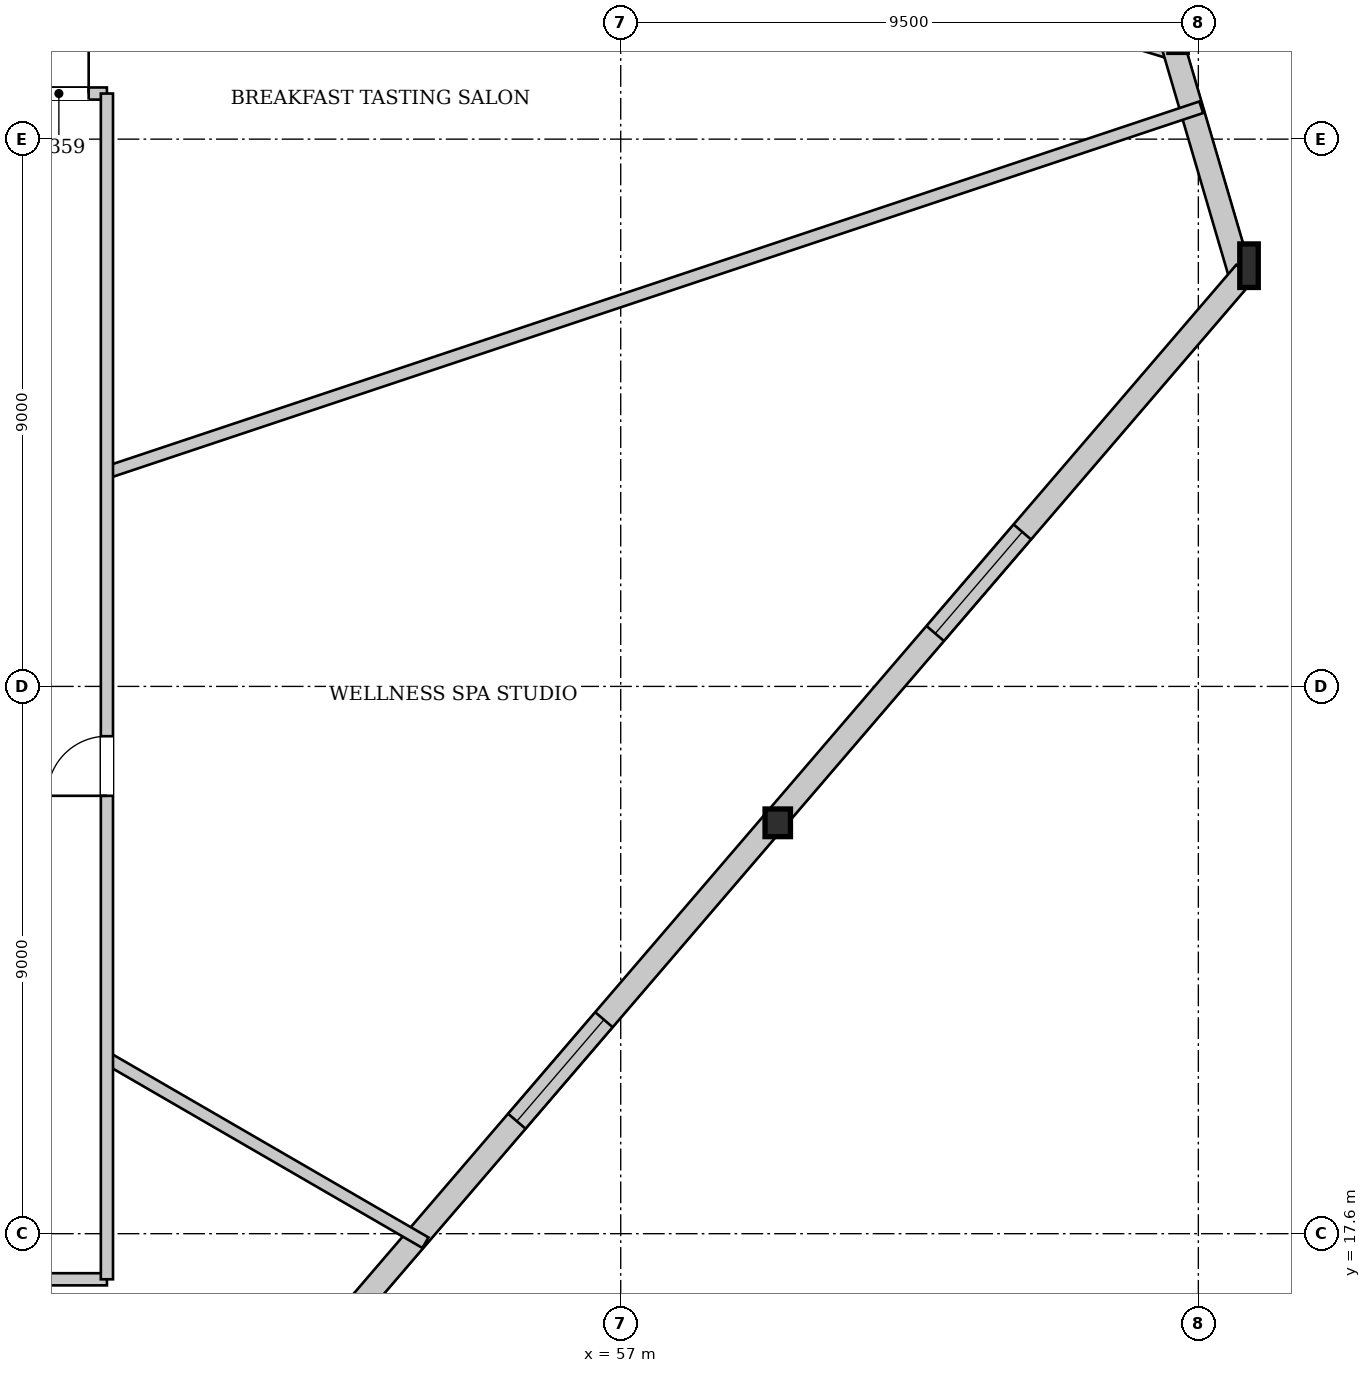
"""IFC4 building model, lengths in metres.
Left out: names, types, materials, properties, quantities, classifications, styles, units other than length and angle.
Written with IfcOpenShell. Run it as: python <this file> out.ifc"""

import sys

from ifc_helpers import new_model, si_unit, direction, frame, frame_2d, origin, origin_2d, place, context, subcontext, project, spatial, rectangle, i_section, extrude, source, transform, mapped, element, fill, save


model = new_model("IFC4")
c1 = context("Model", 3, precision=1e-05, world=origin(), true_north=direction((0.0, 1.0)))
c2 = subcontext(c1, "Body", "Model", "MODEL_VIEW")
j1 = project(units=[si_unit("LENGTHUNIT", "METRE"), si_unit("PLANEANGLEUNIT", "RADIAN")], contexts=[c1])
p1 = place(None, origin())
s1 = spatial("IfcSite", under=j1, at=p1, CompositionType="ELEMENT")
p2 = place(p1, origin())
s2 = spatial("IfcBuilding", under=s1, at=p2, CompositionType="ELEMENT")
p3 = place(p2, frame((0.0, 0.0, 102.15)))
s3 = spatial("IfcBuildingStorey", under=s2, at=p3, CompositionType="ELEMENT", Elevation=102.15)
m1 = source(origin(), c2, "Body", "SweptSolid", [
    extrude(i_section(OverallWidth=0.304, OverallDepth=0.716, WebThickness=0.021, FlangeThickness=0.04, at=origin_2d()), origin(), (0.0, 0.0, 1.0), 3.42),
])
p4 = place(p3, frame((67.412, 33.286, 0.0), z_axis=(-0.045751929855, 0.136185151582, 0.989626376671), x_axis=(-0.947935431433, -0.318462584669, 0.0)))
e1 = element("IfcColumn", 1, at=p4, inside=s3, PredefinedType="COLUMN", context=c2, shape_type="MappedRepresentation", body=[
    mapped(m1, transform((0.0, 0.0, 0.0), x_axis=(1.0, 0.0, 0.0), y_axis=(0.0, 1.0, 0.0), z_axis=(0.0, 0.0, 1.0), scale=1.0)),
])
m2 = source(origin(), c2, "Body", "SweptSolid", [
    extrude(i_section(OverallWidth=0.304, OverallDepth=0.716, WebThickness=0.021, FlangeThickness=0.04, at=origin_2d()), origin(), (0.0, 0.0, 1.0), 3.416),
])
p5 = place(p3, frame((66.27, 37.179, 0.0), z_axis=(-0.060390314415, 0.120280354036, 0.990901431202), x_axis=(-0.893682547282, -0.448699793496, 0.0)))
e2 = element("IfcColumn", 2, at=p5, inside=s3, PredefinedType="COLUMN", context=c2, shape_type="MappedRepresentation", body=[
    mapped(m2, transform((0.0, 0.0, 0.0), x_axis=(1.0, 0.0, 0.0), y_axis=(0.0, 1.0, 0.0), z_axis=(0.0, 0.0, 1.0), scale=1.0)),
])
m3 = source(origin(), c2, "Body", "SweptSolid", [
    extrude(i_section(OverallWidth=0.418, OverallDepth=0.455, WebThickness=0.038, FlangeThickness=0.059, at=origin_2d()), origin(), (0.0, 0.0, 1.0), 3.405),
])
p6 = place(p3, frame((59.593, 24.171, 0.0), z_axis=(-0.005735421853, 0.10904470798, 0.994020299892), x_axis=(-0.998619642425, -0.05252437304, 0.0)))
e3 = element("IfcColumn", 3, at=p6, inside=s3, PredefinedType="COLUMN", context=c2, shape_type="MappedRepresentation", body=[
    mapped(m3, transform((0.0, 0.0, 0.0), x_axis=(1.0, 0.0, 0.0), y_axis=(0.0, 1.0, 0.0), z_axis=(0.0, 0.0, 1.0), scale=1.0)),
])
p7 = place(p3, frame((43.82, 43.838, 0.0), z_axis=(0.0, 0.0, 1.0), x_axis=(0.956744940145, -0.290928031491, 0.0)))
e4 = element("IfcWall", 4, at=p7, inside=s3, PredefinedType="SOLIDWALL", context=c2, shape_type="SweptSolid", body=[
    extrude(rectangle(XDim=23.417, YDim=0.32, at=frame_2d((11.708, 0.0))), origin(), (0.0, 0.0, 1.0), 2.692),
])
p8 = place(p7, frame((6.943, 0.0, 0.0)))
e5 = element("IfcOpeningElement", 5, at=p8, cuts=e4, PredefinedType="OPENING", context=c2, shape_type="SweptSolid", body=[
    extrude(rectangle(XDim=1.1, YDim=2.3, at=frame_2d((0.55, 1.15))), frame((0.0, 0.17, 0.0), z_axis=(0.0, -1.0, 0.0), x_axis=(1.0, 0.0, 0.0)), (0.0, 0.0, 1.0), 0.34),
])
p9 = place(p7, frame((16.428, 0.0, 0.372)))
e6 = element("IfcOpeningElement", 6, at=p9, cuts=e4, PredefinedType="OPENING", context=c2, shape_type="SweptSolid", body=[
    extrude(rectangle(XDim=1.8, YDim=2.2, at=frame_2d((0.9, 1.1))), frame((0.0, 0.17, 0.0), z_axis=(0.0, -1.0, 0.0), x_axis=(1.0, 0.0, 0.0)), (0.0, 0.0, 1.0), 0.34),
])
p10 = place(p3, frame((66.087, 37.125, 0.0), z_axis=(0.0, 0.0, 1.0), x_axis=(0.281534153889, -0.959551207698, 0.0)))
e7 = element("IfcWall", 7, at=p10, inside=s3, PredefinedType="SOLIDWALL", context=c2, shape_type="SweptSolid", body=[
    extrude(rectangle(XDim=4.057, YDim=0.38, at=frame_2d((2.028, 0.0))), origin(), (0.0, 0.0, 1.0), 2.692),
])
p11 = place(p3, frame((67.268, 33.409, 0.0), z_axis=(0.0, 0.0, 1.0), x_axis=(-0.651112760172, -0.75898101, 0.0)))
e8 = element("IfcWall", 8, at=p11, inside=s3, PredefinedType="SOLIDWALL", context=c2, shape_type="SweptSolid", body=[
    extrude(rectangle(XDim=24.018, YDim=0.38, at=frame_2d((12.009, 0.0))), origin(), (0.0, 0.0, 1.0), 2.692),
])
p12 = place(p11, frame((5.625, 0.0, 0.322)))
e9 = element("IfcOpeningElement", 9, at=p12, cuts=e8, PredefinedType="OPENING", context=c2, shape_type="SweptSolid", body=[
    extrude(rectangle(XDim=2.2, YDim=2.25, at=frame_2d((1.1, 1.125))), frame((0.0, 0.2, 0.0), z_axis=(0.0, -1.0, 0.0), x_axis=(1.0, 0.0, 0.0)), (0.0, 0.0, 1.0), 0.4),
])
p13 = place(p11, frame((16.193, 0.0, 0.322)))
e10 = element("IfcOpeningElement", 10, at=p13, cuts=e8, PredefinedType="OPENING", context=c2, shape_type="SweptSolid", body=[
    extrude(rectangle(XDim=2.2, YDim=2.25, at=frame_2d((1.1, 1.125))), frame((0.0, 0.2, 0.0), z_axis=(0.0, -1.0, 0.0), x_axis=(1.0, 0.0, 0.0)), (0.0, 0.0, 1.0), 0.4),
])
p14 = place(p3, frame((48.55, 20.487, 0.0), z_axis=(0.0, 0.0, 1.0), x_axis=(0.865269800029, -0.501306466304, 0.0)))
e11 = element("IfcWall", 11, at=p14, inside=s3, PredefinedType="PARTITIONING", context=c2, shape_type="SweptSolid", body=[
    extrude(rectangle(XDim=6.054, YDim=0.2, at=frame_2d((3.027, 0.0))), origin(), (0.0, 0.0, 1.0), 3.3),
])
p15 = place(p3, frame((48.55, 30.12, 0.0), z_axis=(0.0, 0.0, 1.0), x_axis=(0.948597047754, 0.31648639938, 0.0)))
e12 = element("IfcWall", 12, at=p15, inside=s3, PredefinedType="PARTITIONING", context=c2, shape_type="SweptSolid", body=[
    extrude(rectangle(XDim=18.973, YDim=0.2, at=frame_2d((9.486, 0.0))), origin(), (0.0, 0.0, 1.0), 3.3),
])
p16 = place(p3, frame((27.45, 16.85, 0.0), z_axis=(0.0, 0.0, 1.0), x_axis=(1.0, 0.0, 0.0)))
e13 = element("IfcWall", 13, at=p16, inside=s3, PredefinedType="PARTITIONING", context=c2, shape_type="SweptSolid", body=[
    extrude(rectangle(XDim=21.1, YDim=0.2, at=frame_2d((10.55, 0.0))), origin(), (0.0, 0.0, 1.0), 3.3),
])
p17 = place(p16, frame((0.3, 0.0, 0.0)))
e14 = element("IfcOpeningElement", 14, at=p17, cuts=e13, PredefinedType="OPENING", context=c2, shape_type="SweptSolid", body=[
    extrude(rectangle(XDim=0.98, YDim=2.15, at=frame_2d((0.49, 1.075))), frame((0.0, 0.11, 0.0), z_axis=(0.0, -1.0, 0.0), x_axis=(1.0, 0.0, 0.0)), (0.0, 0.0, 1.0), 0.22),
])
p18 = place(p16, frame((15.103, 0.0, 0.0)))
e15 = element("IfcOpeningElement", 15, at=p18, cuts=e13, PredefinedType="OPENING", context=c2, shape_type="SweptSolid", body=[
    extrude(rectangle(XDim=0.98, YDim=2.15, at=frame_2d((0.49, 1.075))), frame((0.0, 0.11, 0.0), z_axis=(0.0, -1.0, 0.0), x_axis=(1.0, 0.0, 0.0)), (0.0, 0.0, 1.0), 0.22),
])
p19 = place(p3, frame((27.45, 36.35, 0.0), z_axis=(0.0, 0.0, 1.0), x_axis=(1.0, 0.0, 0.0)))
e16 = element("IfcWall", 16, at=p19, inside=s3, PredefinedType="PARTITIONING", context=c2, shape_type="SweptSolid", body=[
    extrude(rectangle(XDim=21.1, YDim=0.2, at=frame_2d((10.55, 0.0))), origin(), (0.0, 0.0, 1.0), 3.3),
])
p20 = place(p19, frame((19.82, 0.0, 0.0)))
e17 = element("IfcOpeningElement", 17, at=p20, cuts=e16, PredefinedType="OPENING", context=c2, shape_type="SweptSolid", body=[
    extrude(rectangle(XDim=0.98, YDim=2.15, at=frame_2d((0.49, 1.075))), frame((0.0, 0.11, 0.0), z_axis=(0.0, -1.0, 0.0), x_axis=(1.0, 0.0, 0.0)), (0.0, 0.0, 1.0), 0.22),
])
p21 = place(p19, frame((8.513, 0.0, 0.0)))
e18 = element("IfcOpeningElement", 18, at=p21, cuts=e16, PredefinedType="OPENING", context=c2, shape_type="SweptSolid", body=[
    extrude(rectangle(XDim=0.98, YDim=2.15, at=frame_2d((0.49, 1.075))), frame((0.0, 0.11, 0.0), z_axis=(0.0, -1.0, 0.0), x_axis=(1.0, 0.0, 0.0)), (0.0, 0.0, 1.0), 0.22),
])
p22 = place(p3, frame((48.55, 16.85, 0.0), z_axis=(0.0, 0.0, 1.0), x_axis=(0.0, 1.0, 0.0)))
e19 = element("IfcWall", 19, at=p22, inside=s3, PredefinedType="PARTITIONING", context=c2, shape_type="SweptSolid", body=[
    extrude(rectangle(XDim=19.5, YDim=0.2, at=frame_2d((9.75, 0.0))), origin(), (0.0, 0.0, 1.0), 3.3),
])
p23 = place(p22, frame((7.951, 0.0, 0.0)))
e20 = element("IfcOpeningElement", 20, at=p23, cuts=e19, PredefinedType="OPENING", context=c2, shape_type="SweptSolid", body=[
    extrude(rectangle(XDim=0.98, YDim=2.15, at=frame_2d((0.49, 1.075))), frame((0.0, 0.11, 0.0), z_axis=(0.0, -1.0, 0.0), x_axis=(1.0, 0.0, 0.0)), (0.0, 0.0, 1.0), 0.22),
])
m4 = source(origin(), c2, "Body", "SweptSolid", [
    extrude(rectangle(XDim=2.2, YDim=2.25, at=frame_2d((1.1, 1.125))), frame((0.0, 0.03, 0.0), z_axis=(0.0, -1.0, 0.0), x_axis=(1.0, 0.0, 0.0)), (0.0, 0.0, 1.0), 0.06),
])
p24 = place(p12, origin())
e21 = element("IfcWindow", 21, at=p24, inside=s3, PartitioningType="SINGLE_PANEL", PredefinedType="WINDOW", context=c2, shape_type="MappedRepresentation", body=[
    mapped(m4, transform((0.0, 0.0, 0.0), x_axis=(1.0, 0.0, 0.0), y_axis=(0.0, 1.0, 0.0), z_axis=(0.0, 0.0, 1.0), scale=1.0)),
])
fill(e9, e21)
p25 = place(p13, origin())
e22 = element("IfcWindow", 22, at=p25, inside=s3, PartitioningType="SINGLE_PANEL", PredefinedType="WINDOW", context=c2, shape_type="MappedRepresentation", body=[
    mapped(m4, transform((0.0, 0.0, 0.0), x_axis=(1.0, 0.0, 0.0), y_axis=(0.0, 1.0, 0.0), z_axis=(0.0, 0.0, 1.0), scale=1.0)),
])
fill(e10, e22)
m5 = source(origin(), c2, "Body", "SweptSolid", [
    extrude(rectangle(XDim=0.98, YDim=2.15, at=frame_2d((0.49, 1.075))), frame((0.0, 0.025, 0.0), z_axis=(0.0, -1.0, 0.0), x_axis=(1.0, 0.0, 0.0)), (0.0, 0.0, 1.0), 0.05),
])
p26 = place(p20, origin())
e23 = element("IfcDoor", 23, at=p26, inside=s3, OperationType="SINGLE_SWING_RIGHT", PredefinedType="DOOR", context=c2, shape_type="MappedRepresentation", body=[
    mapped(m5, transform((0.0, 0.0, 0.0), x_axis=(1.0, 0.0, 0.0), y_axis=(0.0, 1.0, 0.0), z_axis=(0.0, 0.0, 1.0), scale=1.0)),
])
fill(e17, e23)
p27 = place(p23, origin())
e24 = element("IfcDoor", 24, at=p27, inside=s3, OperationType="SINGLE_SWING_LEFT", PredefinedType="DOOR", context=c2, shape_type="MappedRepresentation", body=[
    mapped(m5, transform((0.0, 0.0, 0.0), x_axis=(1.0, 0.0, 0.0), y_axis=(0.0, 1.0, 0.0), z_axis=(0.0, 0.0, 1.0), scale=1.0)),
])
fill(e20, e24)
save(model, sys.argv[1])
